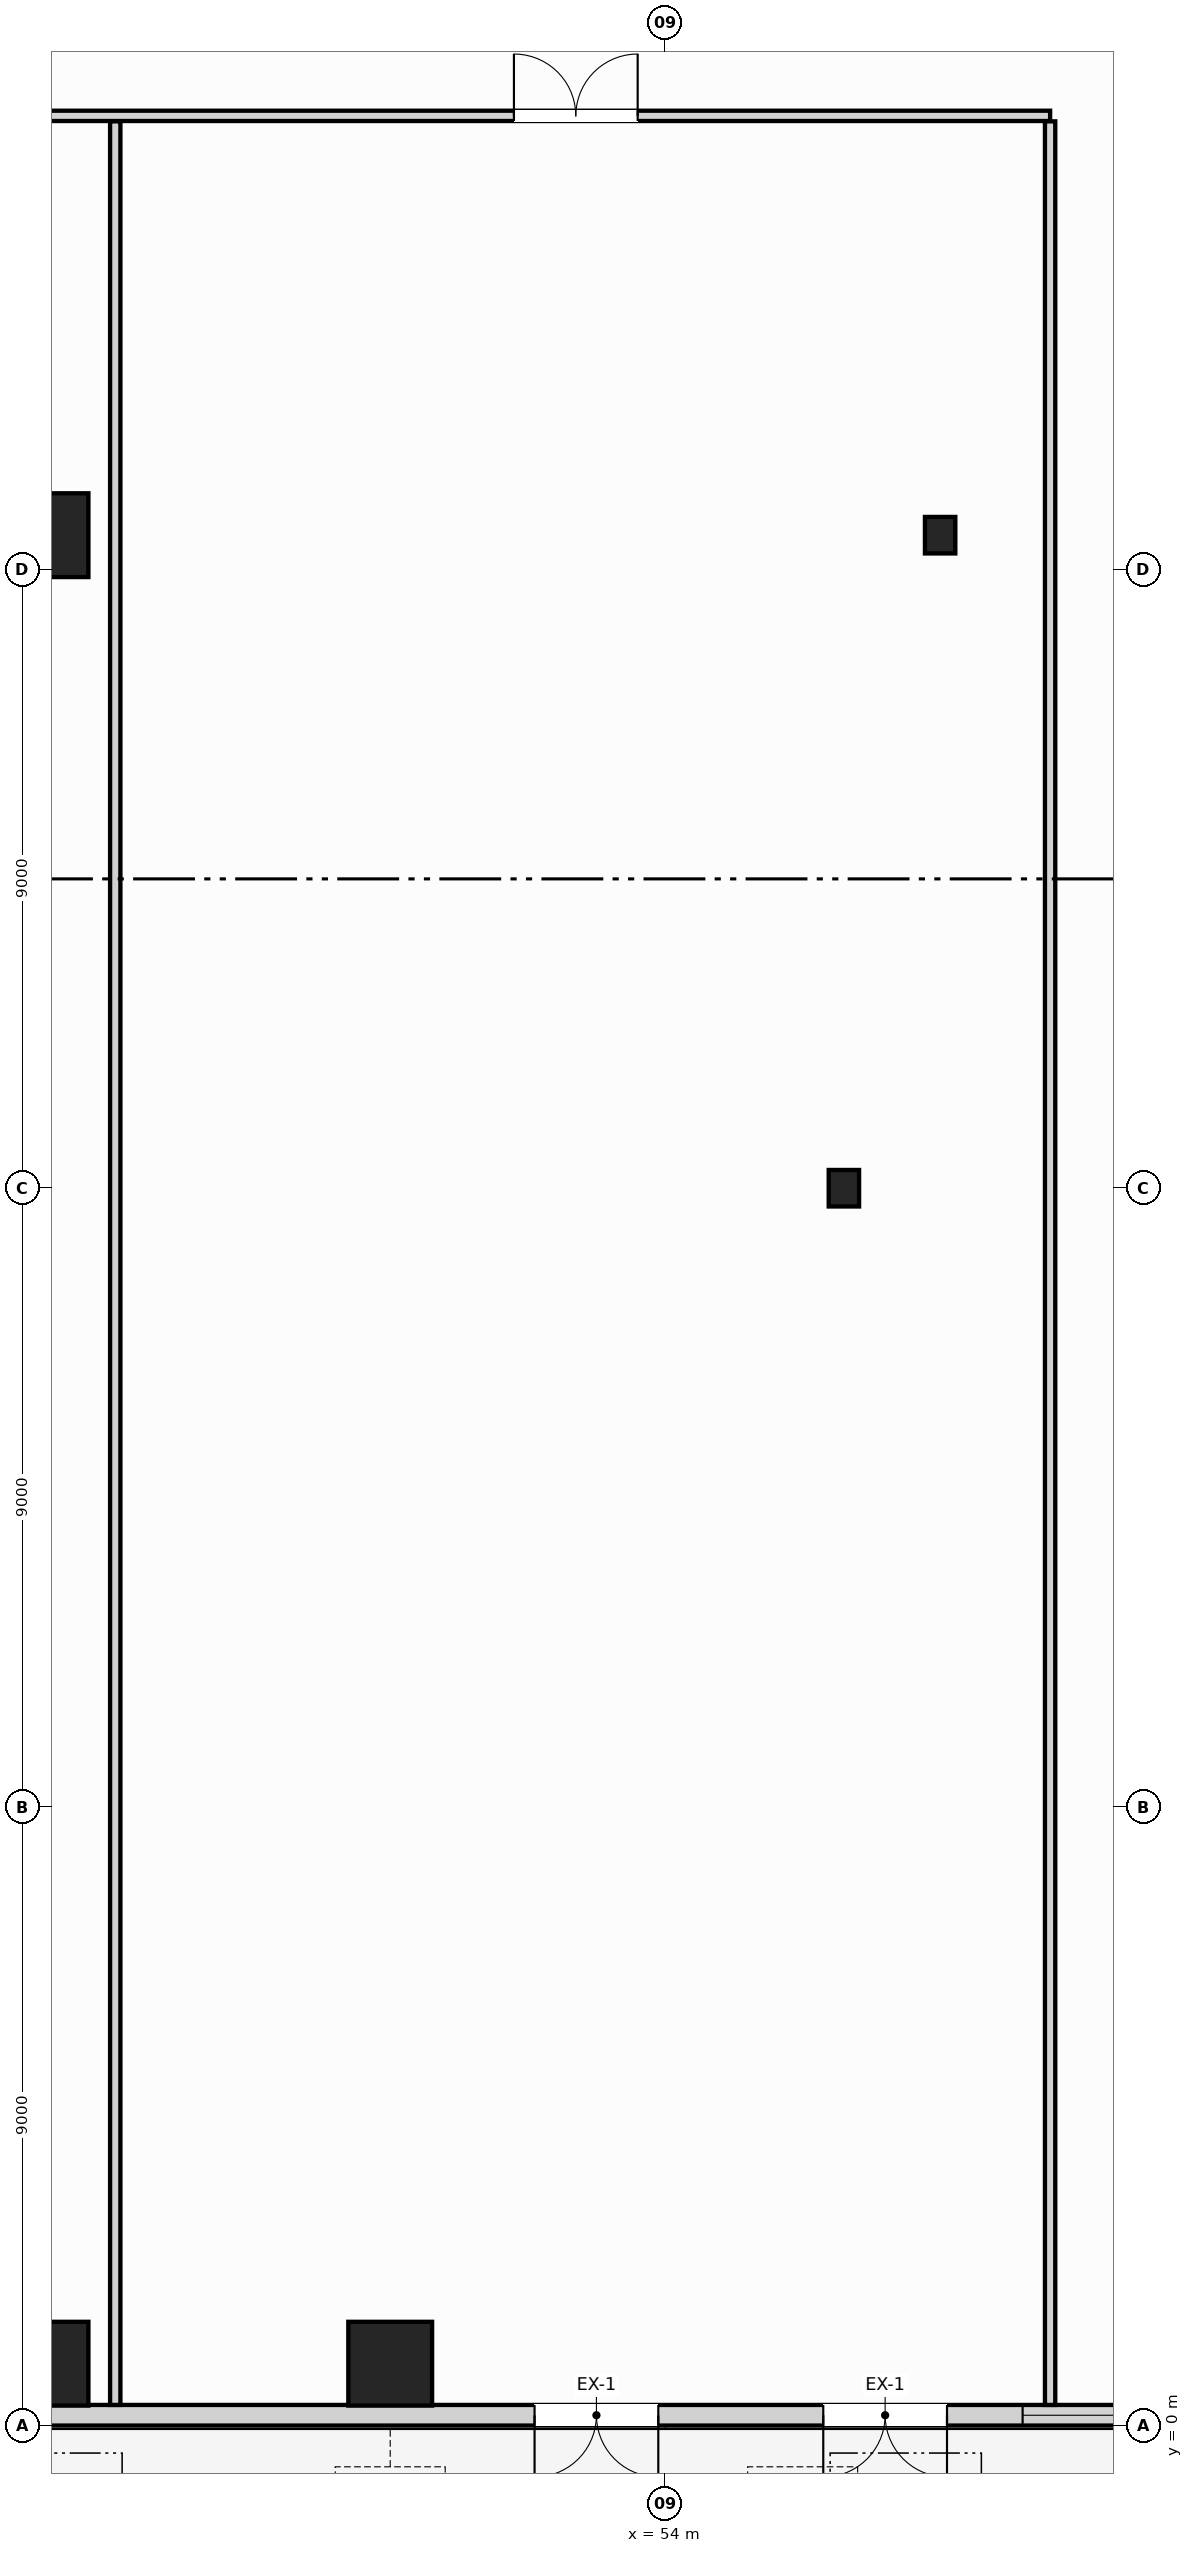
"""IFC4 building model, lengths in metres.
Left out: names, types, materials, properties, quantities, classifications, styles, units other than length and angle.
Written with IfcOpenShell. Run it as: python <this file> out.ifc"""

import sys

from ifc_helpers import new_model, si_unit, direction, frame, frame_2d, origin, origin_2d, place, context, subcontext, project, spatial, rectangle, hollow_circle, i_section, extrude, source, transform, mapped, element, fill, save


model = new_model("IFC4")
c1 = context("Model", 3, precision=1e-05, world=origin(), true_north=direction((0.0, 1.0)))
c2 = subcontext(c1, "Body", "Model", "MODEL_VIEW")
j1 = project(units=[si_unit("LENGTHUNIT", "METRE"), si_unit("PLANEANGLEUNIT", "RADIAN")], contexts=[c1])
p1 = place(None, origin())
s1 = spatial("IfcSite", under=j1, at=p1, CompositionType="ELEMENT")
p2 = place(p1, origin())
s2 = spatial("IfcBuilding", under=s1, at=p2, CompositionType="ELEMENT")
p3 = place(p2, origin())
s3 = spatial("IfcBuildingStorey", under=s2, at=p3, CompositionType="ELEMENT", Elevation=0.0)
m1 = source(origin(), c2, "Body", "SweptSolid", [
    extrude(hollow_circle(Radius=0.61, WallThickness=0.05, at=origin_2d()), origin(), (0.0, 0.0, 1.0), 5.6),
])
for number, where, z_axis, x_axis in (
    (1, (45.0, 0.9, 0.0), (0.0, 0.0, 1.0), (1.0, 0.0, 0.0)),
    (2, (50.0, 0.9, 0.0), (0.0, 0.0, 1.0), (1.0, 0.0, 0.0)),
):
    element("IfcColumn", number, at=place(p3, frame(where, z_axis=z_axis, x_axis=x_axis)), inside=s3, PredefinedType="COLUMN", context=c2, shape_type="MappedRepresentation", body=[
        mapped(m1, transform((0.0, 0.0, 0.0), scale=1.0)),
    ])
m2 = source(origin(), c2, "Body", "SweptSolid", [
    extrude(i_section(OverallWidth=0.442, OverallDepth=0.531, WebThickness=0.065, FlangeThickness=0.076, FilletRadius=0.015, at=origin_2d()), origin(), (0.0, 0.0, 1.0), 5.6),
])
for number, where, z_axis, x_axis in (
    (3, (58.0, 27.5, 0.0), (0.0, 0.0, 1.0), (1.0, 0.0, 0.0)),
    (4, (56.6, 18.0, 0.0), (0.0, 0.0, 1.0), (1.0, 0.0, 0.0)),
):
    element("IfcColumn", number, at=place(p3, frame(where, z_axis=z_axis, x_axis=x_axis)), inside=s3, PredefinedType="COLUMN", context=c2, shape_type="MappedRepresentation", body=[
        mapped(m2, transform((0.0, 0.0, 0.0), scale=1.0)),
    ])
p4 = place(p3, frame((45.0, 27.5, 0.0), z_axis=(0.0, 0.0, 1.0), x_axis=(1.0, 0.0, 0.0)))
e5 = element("IfcColumn", 5, at=p4, inside=s3, PredefinedType="COLUMN", context=c2, shape_type="MappedRepresentation", body=[
    mapped(m1, transform((0.0, 0.0, 0.0), scale=1.0)),
])
p5 = place(p3, frame((66.34, 0.15, 0.0), z_axis=(0.0, 0.0, 1.0), x_axis=(-1.0, 0.0, 0.0)))
e6 = element("IfcWall", 6, at=p5, inside=s3, PredefinedType="STANDARD", context=c2, shape_type="SweptSolid", body=[
    extrude(rectangle(XDim=64.68, YDim=0.3, at=frame_2d((32.34, 0.0))), origin(), (0.0, 0.0, 1.0), 5.32),
])
p6 = place(p5, frame((54.64, 0.0, 0.0)))
e7 = element("IfcOpeningElement", 7, at=p6, cuts=e6, PredefinedType="OPENING", context=c2, shape_type="SweptSolid", body=[
    extrude(rectangle(XDim=1.8, YDim=2.4, at=frame_2d((0.9, 1.2))), frame((0.0, 0.16, 0.0), z_axis=(0.0, -1.0, 0.0), x_axis=(1.0, 0.0, 0.0)), (0.0, 0.0, 1.0), 0.32),
])
p7 = place(p5, frame((50.24, 0.0, 0.0)))
e8 = element("IfcOpeningElement", 8, at=p7, cuts=e6, PredefinedType="OPENING", context=c2, shape_type="SweptSolid", body=[
    extrude(rectangle(XDim=1.8, YDim=2.4, at=frame_2d((0.9, 1.2))), frame((0.0, 0.16, 0.0), z_axis=(0.0, -1.0, 0.0), x_axis=(1.0, 0.0, 0.0)), (0.0, 0.0, 1.0), 0.32),
])
p8 = place(p5, frame((39.44, 0.0, 0.0)))
e9 = element("IfcOpeningElement", 9, at=p8, cuts=e6, PredefinedType="OPENING", context=c2, shape_type="SweptSolid", body=[
    extrude(rectangle(XDim=1.8, YDim=2.4, at=frame_2d((0.9, 1.2))), frame((0.0, 0.16, 0.0), z_axis=(0.0, -1.0, 0.0), x_axis=(1.0, 0.0, 0.0)), (0.0, 0.0, 1.0), 0.32),
])
p9 = place(p5, frame((31.44, 0.0, 0.0)))
e10 = element("IfcOpeningElement", 10, at=p9, cuts=e6, PredefinedType="OPENING", context=c2, shape_type="SweptSolid", body=[
    extrude(rectangle(XDim=1.8, YDim=2.4, at=frame_2d((0.9, 1.2))), frame((0.0, 0.16, 0.0), z_axis=(0.0, -1.0, 0.0), x_axis=(1.0, 0.0, 0.0)), (0.0, 0.0, 1.0), 0.32),
])
p10 = place(p5, frame((23.44, 0.0, 0.0)))
e11 = element("IfcOpeningElement", 11, at=p10, cuts=e6, PredefinedType="OPENING", context=c2, shape_type="SweptSolid", body=[
    extrude(rectangle(XDim=1.8, YDim=2.4, at=frame_2d((0.9, 1.2))), frame((0.0, 0.16, 0.0), z_axis=(0.0, -1.0, 0.0), x_axis=(1.0, 0.0, 0.0)), (0.0, 0.0, 1.0), 0.32),
])
p11 = place(p5, frame((12.44, 0.0, 0.0)))
e12 = element("IfcOpeningElement", 12, at=p11, cuts=e6, PredefinedType="OPENING", context=c2, shape_type="SweptSolid", body=[
    extrude(rectangle(XDim=1.8, YDim=2.4, at=frame_2d((0.9, 1.2))), frame((0.0, 0.16, 0.0), z_axis=(0.0, -1.0, 0.0), x_axis=(1.0, 0.0, 0.0)), (0.0, 0.0, 1.0), 0.32),
])
p12 = place(p5, frame((8.24, 0.0, 0.0)))
e13 = element("IfcOpeningElement", 13, at=p12, cuts=e6, PredefinedType="OPENING", context=c2, shape_type="SweptSolid", body=[
    extrude(rectangle(XDim=1.8, YDim=2.4, at=frame_2d((0.9, 1.2))), frame((0.0, 0.16, 0.0), z_axis=(0.0, -1.0, 0.0), x_axis=(1.0, 0.0, 0.0)), (0.0, 0.0, 1.0), 0.32),
])
p13 = place(p5, frame((1.64, 0.0, 0.0)))
e14 = element("IfcOpeningElement", 14, at=p13, cuts=e6, PredefinedType="OPENING", context=c2, shape_type="SweptSolid", body=[
    extrude(rectangle(XDim=1.8, YDim=2.4, at=frame_2d((0.9, 1.2))), frame((0.0, 0.16, 0.0), z_axis=(0.0, -1.0, 0.0), x_axis=(1.0, 0.0, 0.0)), (0.0, 0.0, 1.0), 0.32),
])
p14 = place(p5, frame((60.34, 0.0, 1.1)))
e15 = element("IfcOpeningElement", 15, at=p14, cuts=e6, PredefinedType="OPENING", context=c2, shape_type="SweptSolid", body=[
    extrude(rectangle(XDim=2.4, YDim=2.2, at=frame_2d((1.2, 1.1))), frame((0.0, 0.16, 0.0), z_axis=(0.0, -1.0, 0.0), x_axis=(1.0, 0.0, 0.0)), (0.0, 0.0, 1.0), 0.32),
])
p15 = place(p5, frame((34.94, 0.0, 1.1)))
e16 = element("IfcOpeningElement", 16, at=p15, cuts=e6, PredefinedType="OPENING", context=c2, shape_type="SweptSolid", body=[
    extrude(rectangle(XDim=2.4, YDim=2.2, at=frame_2d((1.2, 1.1))), frame((0.0, 0.16, 0.0), z_axis=(0.0, -1.0, 0.0), x_axis=(1.0, 0.0, 0.0)), (0.0, 0.0, 1.0), 0.32),
])
p16 = place(p5, frame((27.34, 0.0, 1.1)))
e17 = element("IfcOpeningElement", 17, at=p16, cuts=e6, PredefinedType="OPENING", context=c2, shape_type="SweptSolid", body=[
    extrude(rectangle(XDim=2.4, YDim=2.2, at=frame_2d((1.2, 1.1))), frame((0.0, 0.16, 0.0), z_axis=(0.0, -1.0, 0.0), x_axis=(1.0, 0.0, 0.0)), (0.0, 0.0, 1.0), 0.32),
])
p17 = place(p5, frame((4.74, 0.0, 1.1)))
e18 = element("IfcOpeningElement", 18, at=p17, cuts=e6, PredefinedType="OPENING", context=c2, shape_type="SweptSolid", body=[
    extrude(rectangle(XDim=2.4, YDim=2.2, at=frame_2d((1.2, 1.1))), frame((0.0, 0.16, 0.0), z_axis=(0.0, -1.0, 0.0), x_axis=(1.0, 0.0, 0.0)), (0.0, 0.0, 1.0), 0.32),
])
p18 = place(p3, frame((0.3, 33.6, 0.0), z_axis=(0.0, 0.0, 1.0), x_axis=(1.0, 0.0, 0.0)))
e19 = element("IfcWall", 19, at=p18, inside=s3, PredefinedType="PARTITIONING", context=c2, shape_type="SweptSolid", body=[
    extrude(rectangle(XDim=59.3, YDim=0.15, at=frame_2d((29.65, 0.0))), origin(), (0.0, 0.0, 1.0), 5.32),
])
p19 = place(p18, frame((3.5, 0.0, 0.0)))
e20 = element("IfcOpeningElement", 20, at=p19, cuts=e19, PredefinedType="OPENING", context=c2, shape_type="SweptSolid", body=[
    extrude(rectangle(XDim=1.1, YDim=2.15, at=frame_2d((0.55, 1.075))), frame((0.0, 0.085, 0.0), z_axis=(0.0, -1.0, 0.0), x_axis=(1.0, 0.0, 0.0)), (0.0, 0.0, 1.0), 0.17),
])
p20 = place(p18, frame((14.0, 0.0, 0.0)))
e21 = element("IfcOpeningElement", 21, at=p20, cuts=e19, PredefinedType="OPENING", context=c2, shape_type="SweptSolid", body=[
    extrude(rectangle(XDim=1.8, YDim=2.25, at=frame_2d((0.9, 1.125))), frame((0.0, 0.085, 0.0), z_axis=(0.0, -1.0, 0.0), x_axis=(1.0, 0.0, 0.0)), (0.0, 0.0, 1.0), 0.17),
])
p21 = place(p18, frame((32.5, 0.0, 0.0)))
e22 = element("IfcOpeningElement", 22, at=p21, cuts=e19, PredefinedType="OPENING", context=c2, shape_type="SweptSolid", body=[
    extrude(rectangle(XDim=1.8, YDim=2.25, at=frame_2d((0.9, 1.125))), frame((0.0, 0.085, 0.0), z_axis=(0.0, -1.0, 0.0), x_axis=(1.0, 0.0, 0.0)), (0.0, 0.0, 1.0), 0.17),
])
p22 = place(p18, frame((51.5, 0.0, 0.0)))
e23 = element("IfcOpeningElement", 23, at=p22, cuts=e19, PredefinedType="OPENING", context=c2, shape_type="SweptSolid", body=[
    extrude(rectangle(XDim=1.8, YDim=2.25, at=frame_2d((0.9, 1.125))), frame((0.0, 0.085, 0.0), z_axis=(0.0, -1.0, 0.0), x_axis=(1.0, 0.0, 0.0)), (0.0, 0.0, 1.0), 0.17),
])
p23 = place(p3, frame((59.6, 0.3, 0.0), z_axis=(0.0, 0.0, 1.0), x_axis=(0.0, 1.0, 0.0)))
e24 = element("IfcWall", 24, at=p23, inside=s3, PredefinedType="PARTITIONING", context=c2, shape_type="SweptSolid", body=[
    extrude(rectangle(XDim=33.22, YDim=0.15, at=frame_2d((16.61, 0.0))), origin(), (0.0, 0.0, 1.0), 4.4),
])
p24 = place(p3, frame((46.0, 0.3, 0.0), z_axis=(0.0, 0.0, 1.0), x_axis=(0.0, 1.0, 0.0)))
e25 = element("IfcWall", 25, at=p24, inside=s3, PredefinedType="PARTITIONING", context=c2, shape_type="SweptSolid", body=[
    extrude(rectangle(XDim=33.22, YDim=0.15, at=frame_2d((16.61, 0.0))), origin(), (0.0, 0.0, 1.0), 5.32),
])
m3 = source(origin(), c2, "Body", "SweptSolid", [
    extrude(rectangle(XDim=1.8, YDim=2.4, at=frame_2d((0.9, 1.2))), frame((0.0, 0.025, 0.0), z_axis=(0.0, -1.0, 0.0), x_axis=(1.0, 0.0, 0.0)), (0.0, 0.0, 1.0), 0.05),
])
p25 = place(p11, origin())
e26 = element("IfcDoor", 26, at=p25, inside=s3, OperationType="DOUBLE_DOOR_SINGLE_SWING", PredefinedType="DOOR", context=c2, shape_type="MappedRepresentation", body=[
    mapped(m3, transform((0.0, 0.0, 0.0), scale=1.0)),
])
fill(e12, e26)
p26 = place(p12, origin())
e27 = element("IfcDoor", 27, at=p26, inside=s3, OperationType="DOUBLE_DOOR_SINGLE_SWING", PredefinedType="DOOR", context=c2, shape_type="MappedRepresentation", body=[
    mapped(m3, transform((0.0, 0.0, 0.0), scale=1.0)),
])
fill(e13, e27)
m4 = source(origin(), c2, "Body", "SweptSolid", [
    extrude(rectangle(XDim=2.4, YDim=2.2, at=frame_2d((1.2, 1.1))), frame((0.0, 0.03, 0.0), z_axis=(0.0, -1.0, 0.0), x_axis=(1.0, 0.0, 0.0)), (0.0, 0.0, 1.0), 0.06),
])
p27 = place(p17, origin())
e28 = element("IfcWindow", 28, at=p27, inside=s3, PartitioningType="SINGLE_PANEL", PredefinedType="WINDOW", context=c2, shape_type="MappedRepresentation", body=[
    mapped(m4, transform((0.0, 0.0, 0.0), scale=1.0)),
])
fill(e18, e28)
p28 = place(p3, frame((0.0, 0.0, 4.8)))
p29 = place(p28, frame((45.0, -1.0, 0.0)))
p30 = place(p29, frame((0.0, 0.0, 0.17)))
e29 = element("IfcWindow", 29, at=p30, inside=s3, PartitioningType="SINGLE_PANEL", PredefinedType="SKYLIGHT", context=c2, shape_type="SweptSolid", body=[
    extrude(rectangle(XDim=2.2, YDim=1.2, at=origin_2d()), origin(), (0.0, 0.0, 1.0), 0.05),
])
p31 = place(p28, frame((57.5, -1.0, 0.0)))
p32 = place(p31, frame((0.0, 0.0, 0.17)))
e30 = element("IfcWindow", 30, at=p32, inside=s3, PartitioningType="SINGLE_PANEL", PredefinedType="SKYLIGHT", context=c2, shape_type="SweptSolid", body=[
    extrude(rectangle(XDim=2.2, YDim=1.2, at=origin_2d()), origin(), (0.0, 0.0, 1.0), 0.05),
])
m5 = source(origin(), c2, "Body", "SweptSolid", [
    extrude(rectangle(XDim=1.8, YDim=2.25, at=frame_2d((0.9, 1.125))), frame((0.0, 0.025, 0.0), z_axis=(0.0, -1.0, 0.0), x_axis=(1.0, 0.0, 0.0)), (0.0, 0.0, 1.0), 0.05),
])
p33 = place(p22, origin())
e31 = element("IfcDoor", 31, at=p33, inside=s3, OperationType="DOUBLE_DOOR_SINGLE_SWING", PredefinedType="DOOR", context=c2, shape_type="MappedRepresentation", body=[
    mapped(m5, transform((0.0, 0.0, 0.0), scale=1.0)),
])
fill(e23, e31)
save(model, sys.argv[1])
